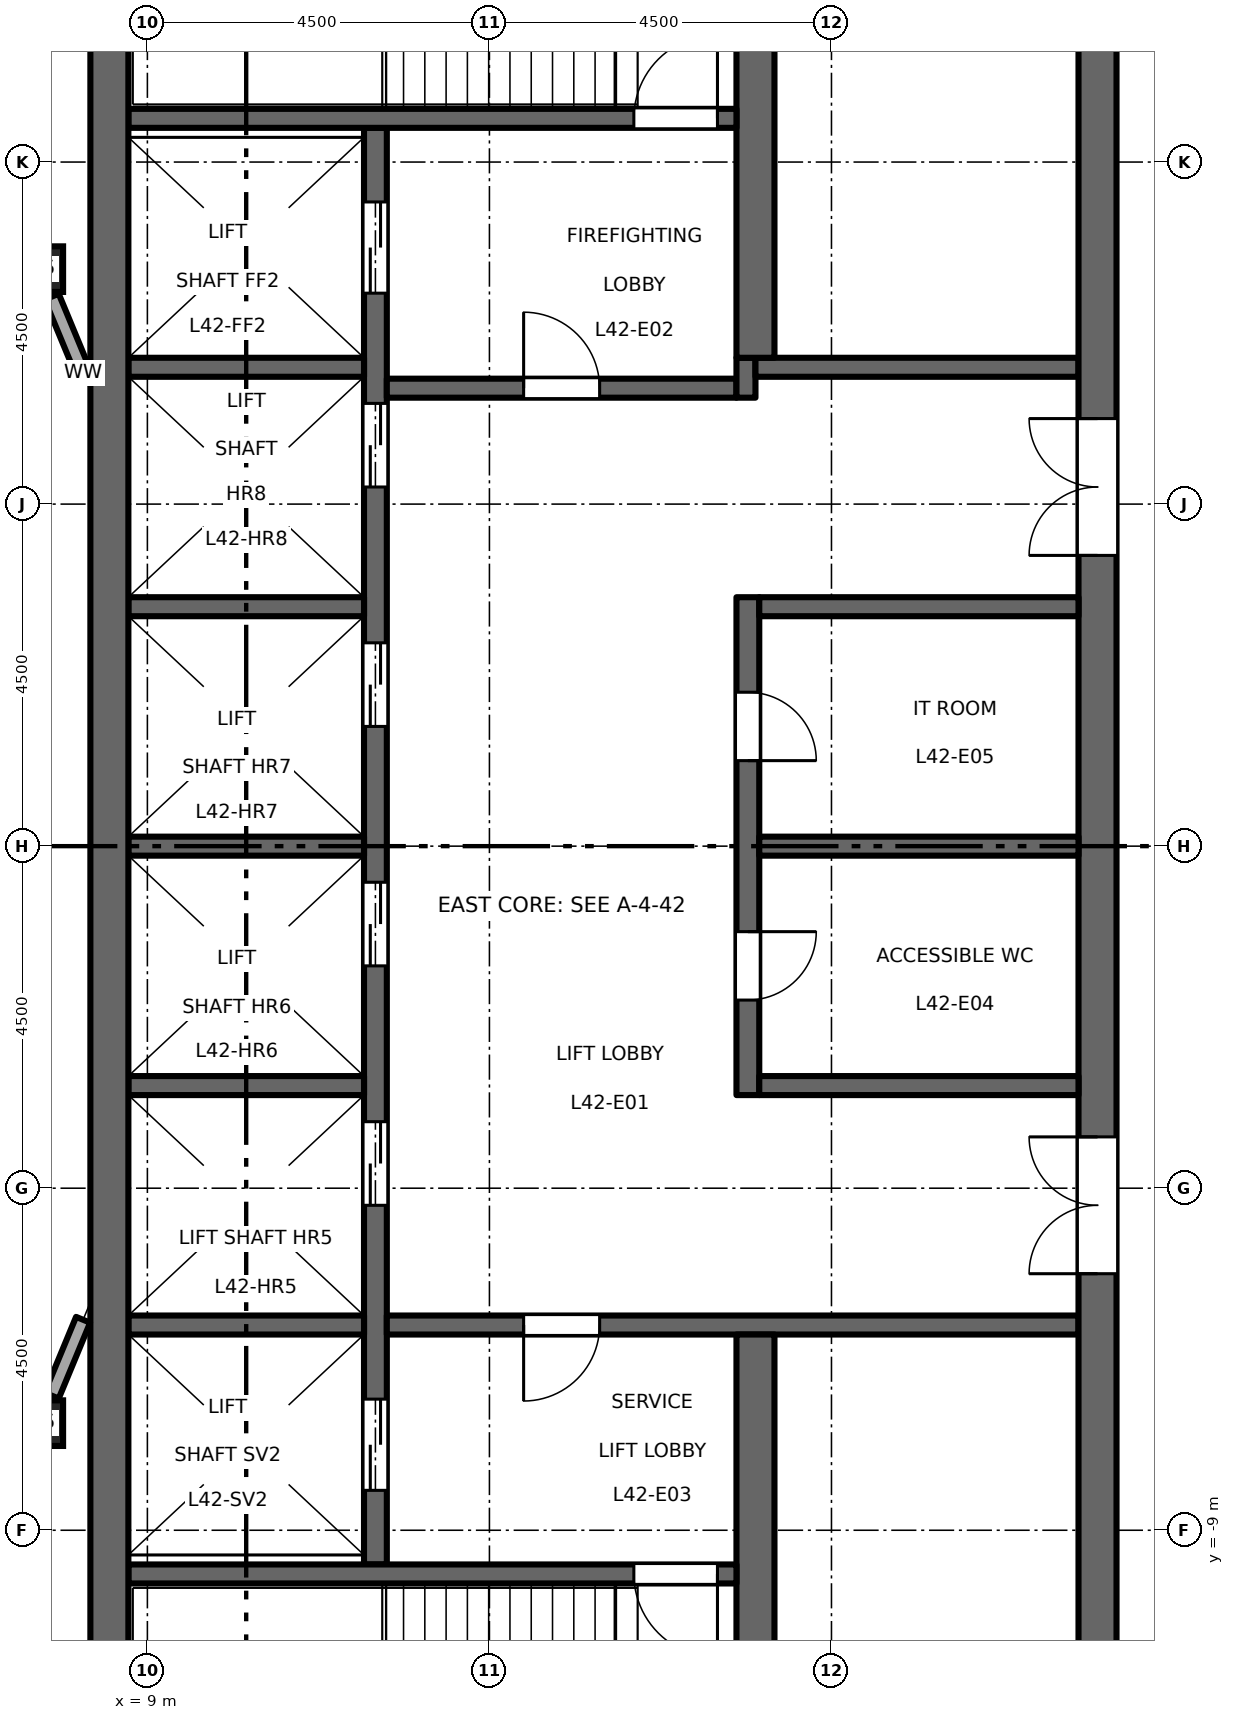
"""IFC4 building model, lengths in metres.
Left out: names, types, materials, properties, quantities, classifications, styles, units other than length and angle.
Written with IfcOpenShell. Run it as: python <this file> out.ifc"""

import sys

from ifc_helpers import new_model, si_unit, direction, frame, frame_2d, origin, origin_2d, place, context, subcontext, project, spatial, rectangle, hollow_rectangle, extrude, element, fill, save


model = new_model("IFC4")
c1 = context("Model", 3, precision=1e-05, world=origin(), true_north=direction((0.0, 1.0)))
c2 = subcontext(c1, "Body", "Model", "MODEL_VIEW")
j1 = project(units=[si_unit("LENGTHUNIT", "METRE"), si_unit("PLANEANGLEUNIT", "RADIAN")], contexts=[c1])
p1 = place(None, origin())
s1 = spatial("IfcSite", under=j1, at=p1, CompositionType="ELEMENT")
p2 = place(p1, origin())
s2 = spatial("IfcBuilding", under=s1, at=p2, CompositionType="ELEMENT")
p3 = place(p2, frame((0.0, 0.0, 197.2)))
s3 = spatial("IfcBuildingStorey", under=s2, at=p3, CompositionType="ELEMENT", Elevation=197.2)
for number, where, z_axis, x_axis in (
    (1, (7.591, -7.591, 0.0), (0.0, 0.0, 1.0), (1.0, 0.0, 0.0)),
    (2, (7.591, 7.591, 0.0), (0.0, 0.0, 1.0), (1.0, 0.0, 0.0)),
):
    element("IfcColumn", number, at=place(p3, frame(where, z_axis=z_axis, x_axis=x_axis)), inside=s3, PredefinedType="COLUMN", context=c2, shape_type="SweptSolid", body=[
        extrude(hollow_rectangle(XDim=0.6, YDim=0.6, WallThickness=0.032, at=origin_2d()), origin(), (0.0, 0.0, 1.0), 4.5),
    ])
p4 = place(p3, frame((12.0, -9.45, 0.0), z_axis=(0.0, 0.0, 1.0), x_axis=(0.0, 1.0, 0.0)))
e3 = element("IfcWall", 3, at=p4, inside=s3, PredefinedType="SHEAR", context=c2, shape_type="SweptSolid", body=[
    extrude(rectangle(XDim=18.9, YDim=0.3, at=frame_2d((9.45, 0.0))), origin(), (0.0, 0.0, 1.0), 4.35),
])
p5 = place(p4, frame((4.725, 0.0, 0.0)))
e4 = element("IfcOpeningElement", 4, at=p5, cuts=e3, PredefinedType="OPENING", context=c2, shape_type="SweptSolid", body=[
    extrude(rectangle(XDim=1.1, YDim=2.1, at=frame_2d((0.55, 1.05))), frame((0.0, 0.16, 0.0), z_axis=(0.0, -1.0, 0.0), x_axis=(1.0, 0.0, 0.0)), (0.0, 0.0, 1.0), 0.32),
])
p6 = place(p4, frame((7.875, 0.0, 0.0)))
e5 = element("IfcOpeningElement", 5, at=p6, cuts=e3, PredefinedType="OPENING", context=c2, shape_type="SweptSolid", body=[
    extrude(rectangle(XDim=1.1, YDim=2.1, at=frame_2d((0.55, 1.05))), frame((0.0, 0.16, 0.0), z_axis=(0.0, -1.0, 0.0), x_axis=(1.0, 0.0, 0.0)), (0.0, 0.0, 1.0), 0.32),
])
p7 = place(p4, frame((11.025, 0.0, 0.0)))
e6 = element("IfcOpeningElement", 6, at=p7, cuts=e3, PredefinedType="OPENING", context=c2, shape_type="SweptSolid", body=[
    extrude(rectangle(XDim=1.1, YDim=2.1, at=frame_2d((0.55, 1.05))), frame((0.0, 0.16, 0.0), z_axis=(0.0, -1.0, 0.0), x_axis=(1.0, 0.0, 0.0)), (0.0, 0.0, 1.0), 0.32),
])
p8 = place(p4, frame((14.175, 0.0, 0.0)))
e7 = element("IfcOpeningElement", 7, at=p8, cuts=e3, PredefinedType="OPENING", context=c2, shape_type="SweptSolid", body=[
    extrude(rectangle(XDim=1.1, YDim=2.1, at=frame_2d((0.55, 1.05))), frame((0.0, 0.16, 0.0), z_axis=(0.0, -1.0, 0.0), x_axis=(1.0, 0.0, 0.0)), (0.0, 0.0, 1.0), 0.32),
])
p9 = place(p4, frame((16.725, 0.0, 0.0)))
e8 = element("IfcOpeningElement", 8, at=p9, cuts=e3, PredefinedType="OPENING", context=c2, shape_type="SweptSolid", body=[
    extrude(rectangle(XDim=1.2, YDim=2.1, at=frame_2d((0.6, 1.05))), frame((0.0, 0.16, 0.0), z_axis=(0.0, -1.0, 0.0), x_axis=(1.0, 0.0, 0.0)), (0.0, 0.0, 1.0), 0.32),
])
p10 = place(p4, frame((0.975, 0.0, 0.0)))
e9 = element("IfcOpeningElement", 9, at=p10, cuts=e3, PredefinedType="OPENING", context=c2, shape_type="SweptSolid", body=[
    extrude(rectangle(XDim=1.2, YDim=2.1, at=frame_2d((0.6, 1.05))), frame((0.0, 0.16, 0.0), z_axis=(0.0, -1.0, 0.0), x_axis=(1.0, 0.0, 0.0)), (0.0, 0.0, 1.0), 0.32),
])
p11 = place(p3, frame((12.15, 6.025, 0.0), z_axis=(0.0, 0.0, 1.0), x_axis=(1.0, 0.0, 0.0)))
e10 = element("IfcWall", 10, at=p11, inside=s3, PredefinedType="SHEAR", context=c2, shape_type="SweptSolid", body=[
    extrude(rectangle(XDim=4.6, YDim=0.25, at=frame_2d((2.3, 0.0))), origin(), (0.0, 0.0, 1.0), 4.35),
])
p12 = place(p11, frame((1.8, 0.0, 0.0)))
e11 = element("IfcOpeningElement", 11, at=p12, cuts=e10, PredefinedType="OPENING", context=c2, shape_type="SweptSolid", body=[
    extrude(rectangle(XDim=1.0, YDim=2.1, at=frame_2d((0.5, 1.05))), frame((0.0, 0.135, 0.0), z_axis=(0.0, -1.0, 0.0), x_axis=(1.0, 0.0, 0.0)), (0.0, 0.0, 1.0), 0.27),
])
p13 = place(p3, frame((16.875, 5.9, 0.0), z_axis=(0.0, 0.0, 1.0), x_axis=(0.0, 1.0, 0.0)))
e12 = element("IfcWall", 12, at=p13, inside=s3, PredefinedType="SHEAR", context=c2, shape_type="SweptSolid", body=[
    extrude(rectangle(XDim=0.525, YDim=0.25, at=frame_2d((0.263, 0.0))), origin(), (0.0, 0.0, 1.0), 4.35),
])
p14 = place(p3, frame((17.0, 6.3, 0.0), z_axis=(0.0, 0.0, 1.0), x_axis=(1.0, 0.0, 0.0)))
e13 = element("IfcWall", 13, at=p14, inside=s3, PredefinedType="SHEAR", context=c2, shape_type="SweptSolid", body=[
    extrude(rectangle(XDim=4.25, YDim=0.25, at=frame_2d((2.125, 0.0))), origin(), (0.0, 0.0, 1.0), 4.35),
])
p15 = place(p3, frame((12.15, -6.3, 0.0), z_axis=(0.0, 0.0, 1.0), x_axis=(1.0, 0.0, 0.0)))
e14 = element("IfcWall", 14, at=p15, inside=s3, PredefinedType="SHEAR", context=c2, shape_type="SweptSolid", body=[
    extrude(rectangle(XDim=9.1, YDim=0.25, at=frame_2d((4.55, 0.0))), origin(), (0.0, 0.0, 1.0), 4.35),
])
p16 = place(p15, frame((1.8, 0.0, 0.0)))
e15 = element("IfcOpeningElement", 15, at=p16, cuts=e14, PredefinedType="OPENING", context=c2, shape_type="SweptSolid", body=[
    extrude(rectangle(XDim=1.0, YDim=2.1, at=frame_2d((0.5, 1.05))), frame((0.0, 0.135, 0.0), z_axis=(0.0, -1.0, 0.0), x_axis=(1.0, 0.0, 0.0)), (0.0, 0.0, 1.0), 0.27),
])
p17 = place(p3, frame((21.5, -13.0, 0.0), z_axis=(0.0, 0.0, 1.0), x_axis=(0.0, 1.0, 0.0)))
e16 = element("IfcWall", 16, at=p17, inside=s3, PredefinedType="SHEAR", context=c2, shape_type="SweptSolid", body=[
    extrude(rectangle(XDim=26.0, YDim=0.5, at=frame_2d((13.0, 0.0))), origin(), (0.0, 0.0, 1.0), 4.35),
])
p18 = place(p17, frame((16.825, 0.0, 0.0)))
e17 = element("IfcOpeningElement", 17, at=p18, cuts=e16, PredefinedType="OPENING", context=c2, shape_type="SweptSolid", body=[
    extrude(rectangle(XDim=1.8, YDim=2.1, at=frame_2d((0.9, 1.05))), frame((0.0, 0.26, 0.0), z_axis=(0.0, -1.0, 0.0), x_axis=(1.0, 0.0, 0.0)), (0.0, 0.0, 1.0), 0.52),
])
p19 = place(p17, frame((7.375, 0.0, 0.0)))
e18 = element("IfcOpeningElement", 18, at=p19, cuts=e16, PredefinedType="OPENING", context=c2, shape_type="SweptSolid", body=[
    extrude(rectangle(XDim=1.8, YDim=2.1, at=frame_2d((0.9, 1.05))), frame((0.0, 0.26, 0.0), z_axis=(0.0, -1.0, 0.0), x_axis=(1.0, 0.0, 0.0)), (0.0, 0.0, 1.0), 0.52),
])
p20 = place(p3, frame((16.9, -3.275, 0.0), z_axis=(0.0, 0.0, 1.0), x_axis=(0.0, 1.0, 0.0)))
e19 = element("IfcWall", 19, at=p20, inside=s3, PredefinedType="SHEAR", context=c2, shape_type="SweptSolid", body=[
    extrude(rectangle(XDim=6.55, YDim=0.3, at=frame_2d((3.275, 0.0))), origin(), (0.0, 0.0, 1.0), 4.35),
])
p21 = place(p20, frame((1.25, 0.0, 0.0)))
e20 = element("IfcOpeningElement", 20, at=p21, cuts=e19, PredefinedType="OPENING", context=c2, shape_type="SweptSolid", body=[
    extrude(rectangle(XDim=0.9, YDim=2.1, at=frame_2d((0.45, 1.05))), frame((0.0, 0.16, 0.0), z_axis=(0.0, -1.0, 0.0), x_axis=(1.0, 0.0, 0.0)), (0.0, 0.0, 1.0), 0.32),
])
p22 = place(p20, frame((4.4, 0.0, 0.0)))
e21 = element("IfcOpeningElement", 21, at=p22, cuts=e19, PredefinedType="OPENING", context=c2, shape_type="SweptSolid", body=[
    extrude(rectangle(XDim=0.9, YDim=2.1, at=frame_2d((0.45, 1.05))), frame((0.0, 0.16, 0.0), z_axis=(0.0, -1.0, 0.0), x_axis=(1.0, 0.0, 0.0)), (0.0, 0.0, 1.0), 0.32),
])
for number, where, z_axis, x_axis in (
    (22, (17.05, 0.0, 0.0), (0.0, 0.0, 1.0), (1.0, 0.0, 0.0)),
    (23, (17.05, 3.15, 0.0), (0.0, 0.0, 1.0), (1.0, 0.0, 0.0)),
    (24, (17.05, -3.15, 0.0), (0.0, 0.0, 1.0), (1.0, 0.0, 0.0)),
):
    element("IfcWall", number, at=place(p3, frame(where, z_axis=z_axis, x_axis=x_axis)), inside=s3, PredefinedType="SHEAR", context=c2, shape_type="SweptSolid", body=[
        extrude(rectangle(XDim=4.2, YDim=0.25, at=frame_2d((2.1, 0.0))), origin(), (0.0, 0.0, 1.0), 4.35),
    ])
for number, where, z_axis, x_axis in (
    (25, (17.0, 6.425, 0.0), (0.0, 0.0, 1.0), (0.0, 1.0, 0.0)),
    (26, (17.0, -13.0, 0.0), (0.0, 0.0, 1.0), (0.0, 1.0, 0.0)),
):
    element("IfcWall", number, at=place(p3, frame(where, z_axis=z_axis, x_axis=x_axis)), inside=s3, PredefinedType="SHEAR", context=c2, shape_type="SweptSolid", body=[
        extrude(rectangle(XDim=6.575, YDim=0.5, at=frame_2d((3.288, 0.0))), origin(), (0.0, 0.0, 1.0), 4.35),
    ])
for number, where, z_axis, x_axis in (
    (27, (8.75, 0.0, 0.0), (0.0, 0.0, 1.0), (1.0, 0.0, 0.0)),
    (28, (8.75, 3.15, 0.0), (0.0, 0.0, 1.0), (1.0, 0.0, 0.0)),
    (29, (8.75, 6.3, 0.0), (0.0, 0.0, 1.0), (1.0, 0.0, 0.0)),
    (30, (8.75, -3.15, 0.0), (0.0, 0.0, 1.0), (1.0, 0.0, 0.0)),
    (31, (8.75, -6.3, 0.0), (0.0, 0.0, 1.0), (1.0, 0.0, 0.0)),
):
    element("IfcWall", number, at=place(p3, frame(where, z_axis=z_axis, x_axis=x_axis)), inside=s3, PredefinedType="SHEAR", context=c2, shape_type="SweptSolid", body=[
        extrude(rectangle(XDim=3.1, YDim=0.25, at=frame_2d((1.55, 0.0))), origin(), (0.0, 0.0, 1.0), 4.35),
    ])
p23 = place(p3, frame((8.75, 9.575, 0.0), z_axis=(0.0, 0.0, 1.0), x_axis=(1.0, 0.0, 0.0)))
e32 = element("IfcWall", 32, at=p23, inside=s3, PredefinedType="SHEAR", context=c2, shape_type="SweptSolid", body=[
    extrude(rectangle(XDim=8.0, YDim=0.25, at=frame_2d((4.0, 0.0))), origin(), (0.0, 0.0, 1.0), 4.35),
])
p24 = place(p23, frame((6.65, 0.0, 0.0)))
e33 = element("IfcOpeningElement", 33, at=p24, cuts=e32, PredefinedType="OPENING", context=c2, shape_type="SweptSolid", body=[
    extrude(rectangle(XDim=1.1, YDim=2.1, at=frame_2d((0.55, 1.05))), frame((0.0, 0.135, 0.0), z_axis=(0.0, -1.0, 0.0), x_axis=(1.0, 0.0, 0.0)), (0.0, 0.0, 1.0), 0.27),
])
p25 = place(p3, frame((8.75, -9.575, 0.0), z_axis=(0.0, 0.0, 1.0), x_axis=(1.0, 0.0, 0.0)))
e34 = element("IfcWall", 34, at=p25, inside=s3, PredefinedType="SHEAR", context=c2, shape_type="SweptSolid", body=[
    extrude(rectangle(XDim=8.0, YDim=0.25, at=frame_2d((4.0, 0.0))), origin(), (0.0, 0.0, 1.0), 4.35),
])
p26 = place(p25, frame((6.65, 0.0, 0.0)))
e35 = element("IfcOpeningElement", 35, at=p26, cuts=e34, PredefinedType="OPENING", context=c2, shape_type="SweptSolid", body=[
    extrude(rectangle(XDim=1.1, YDim=2.1, at=frame_2d((0.55, 1.05))), frame((0.0, 0.135, 0.0), z_axis=(0.0, -1.0, 0.0), x_axis=(1.0, 0.0, 0.0)), (0.0, 0.0, 1.0), 0.27),
])
p27 = place(p3, frame((8.5, -13.0, 0.0), z_axis=(0.0, 0.0, 1.0), x_axis=(0.0, 1.0, 0.0)))
e36 = element("IfcWall", 36, at=p27, inside=s3, PredefinedType="SHEAR", context=c2, shape_type="SweptSolid", body=[
    extrude(rectangle(XDim=26.0, YDim=0.5, at=frame_2d((13.0, 0.0))), origin(), (0.0, 0.0, 1.0), 4.35),
])
for number, where, z_axis, x_axis in (
    (37, (7.741, -7.229, 0.0), (0.0, 0.0, 1.0), (0.383, 0.924, 0.0)),
    (38, (8.154, 6.231, 0.0), (0.0, 0.0, 1.0), (-0.383, 0.924, 0.0)),
):
    element("IfcWall", number, at=place(p3, frame(where, z_axis=z_axis, x_axis=x_axis)), inside=s3, PredefinedType="STANDARD", context=c2, shape_type="SweptSolid", body=[
        extrude(rectangle(XDim=1.08, YDim=0.2, at=frame_2d((0.54, 0.0))), origin(), (0.0, 0.0, 1.0), 3.918),
    ])
p28 = place(p12, origin())
e39 = element("IfcDoor", 39, at=p28, inside=s3, OperationType="SINGLE_SWING_RIGHT", PredefinedType="DOOR", context=c2, shape_type="SweptSolid", body=[
    extrude(rectangle(XDim=1.0, YDim=2.1, at=frame_2d((0.5, 1.05))), frame((0.0, 0.025, 0.0), z_axis=(0.0, -1.0, 0.0), x_axis=(1.0, 0.0, 0.0)), (0.0, 0.0, 1.0), 0.05),
])
fill(e11, e39)
p29 = place(p16, origin())
e40 = element("IfcDoor", 40, at=p29, inside=s3, OperationType="SINGLE_SWING_LEFT", PredefinedType="DOOR", context=c2, shape_type="SweptSolid", body=[
    extrude(rectangle(XDim=1.0, YDim=2.1, at=frame_2d((0.5, 1.05))), frame((0.0, 0.025, 0.0), z_axis=(0.0, -1.0, 0.0), x_axis=(1.0, 0.0, 0.0)), (0.0, 0.0, 1.0), 0.05),
])
fill(e15, e40)
p30 = place(p24, origin())
e41 = element("IfcDoor", 41, at=p30, inside=s3, OperationType="SINGLE_SWING_LEFT", PredefinedType="DOOR", context=c2, shape_type="SweptSolid", body=[
    extrude(rectangle(XDim=1.1, YDim=2.1, at=frame_2d((0.55, 1.05))), frame((0.0, 0.025, 0.0), z_axis=(0.0, -1.0, 0.0), x_axis=(1.0, 0.0, 0.0)), (0.0, 0.0, 1.0), 0.05),
])
fill(e33, e41)
p31 = place(p26, origin())
e42 = element("IfcDoor", 42, at=p31, inside=s3, OperationType="SINGLE_SWING_RIGHT", PredefinedType="DOOR", context=c2, shape_type="SweptSolid", body=[
    extrude(rectangle(XDim=1.1, YDim=2.1, at=frame_2d((0.55, 1.05))), frame((0.0, 0.025, 0.0), z_axis=(0.0, -1.0, 0.0), x_axis=(1.0, 0.0, 0.0)), (0.0, 0.0, 1.0), 0.05),
])
fill(e35, e42)
p32 = place(p18, origin())
e43 = element("IfcDoor", 43, at=p32, inside=s3, OperationType="DOUBLE_DOOR_DOUBLE_SWING", PredefinedType="DOOR", context=c2, shape_type="SweptSolid", body=[
    extrude(rectangle(XDim=1.8, YDim=2.1, at=frame_2d((0.9, 1.05))), frame((0.0, 0.025, 0.0), z_axis=(0.0, -1.0, 0.0), x_axis=(1.0, 0.0, 0.0)), (0.0, 0.0, 1.0), 0.05),
])
fill(e17, e43)
p33 = place(p19, origin())
e44 = element("IfcDoor", 44, at=p33, inside=s3, OperationType="DOUBLE_DOOR_DOUBLE_SWING", PredefinedType="DOOR", context=c2, shape_type="SweptSolid", body=[
    extrude(rectangle(XDim=1.8, YDim=2.1, at=frame_2d((0.9, 1.05))), frame((0.0, 0.025, 0.0), z_axis=(0.0, -1.0, 0.0), x_axis=(1.0, 0.0, 0.0)), (0.0, 0.0, 1.0), 0.05),
])
fill(e18, e44)
p34 = place(p5, origin())
e45 = element("IfcDoor", 45, at=p34, inside=s3, OperationType="DOUBLE_DOOR_SLIDING", PredefinedType="DOOR", context=c2, shape_type="SweptSolid", body=[
    extrude(rectangle(XDim=1.1, YDim=2.1, at=frame_2d((0.55, 1.05))), frame((0.0, 0.025, 0.0), z_axis=(0.0, -1.0, 0.0), x_axis=(1.0, 0.0, 0.0)), (0.0, 0.0, 1.0), 0.05),
])
fill(e4, e45)
p35 = place(p6, origin())
e46 = element("IfcDoor", 46, at=p35, inside=s3, OperationType="DOUBLE_DOOR_SLIDING", PredefinedType="DOOR", context=c2, shape_type="SweptSolid", body=[
    extrude(rectangle(XDim=1.1, YDim=2.1, at=frame_2d((0.55, 1.05))), frame((0.0, 0.025, 0.0), z_axis=(0.0, -1.0, 0.0), x_axis=(1.0, 0.0, 0.0)), (0.0, 0.0, 1.0), 0.05),
])
fill(e5, e46)
p36 = place(p7, origin())
e47 = element("IfcDoor", 47, at=p36, inside=s3, OperationType="DOUBLE_DOOR_SLIDING", PredefinedType="DOOR", context=c2, shape_type="SweptSolid", body=[
    extrude(rectangle(XDim=1.1, YDim=2.1, at=frame_2d((0.55, 1.05))), frame((0.0, 0.025, 0.0), z_axis=(0.0, -1.0, 0.0), x_axis=(1.0, 0.0, 0.0)), (0.0, 0.0, 1.0), 0.05),
])
fill(e6, e47)
p37 = place(p8, origin())
e48 = element("IfcDoor", 48, at=p37, inside=s3, OperationType="DOUBLE_DOOR_SLIDING", PredefinedType="DOOR", context=c2, shape_type="SweptSolid", body=[
    extrude(rectangle(XDim=1.1, YDim=2.1, at=frame_2d((0.55, 1.05))), frame((0.0, 0.025, 0.0), z_axis=(0.0, -1.0, 0.0), x_axis=(1.0, 0.0, 0.0)), (0.0, 0.0, 1.0), 0.05),
])
fill(e7, e48)
p38 = place(p9, origin())
e49 = element("IfcDoor", 49, at=p38, inside=s3, OperationType="DOUBLE_DOOR_SLIDING", PredefinedType="DOOR", context=c2, shape_type="SweptSolid", body=[
    extrude(rectangle(XDim=1.2, YDim=2.1, at=frame_2d((0.6, 1.05))), frame((0.0, 0.025, 0.0), z_axis=(0.0, -1.0, 0.0), x_axis=(1.0, 0.0, 0.0)), (0.0, 0.0, 1.0), 0.05),
])
fill(e8, e49)
p39 = place(p10, origin())
e50 = element("IfcDoor", 50, at=p39, inside=s3, OperationType="DOUBLE_DOOR_SLIDING", PredefinedType="DOOR", context=c2, shape_type="SweptSolid", body=[
    extrude(rectangle(XDim=1.2, YDim=2.1, at=frame_2d((0.6, 1.05))), frame((0.0, 0.025, 0.0), z_axis=(0.0, -1.0, 0.0), x_axis=(1.0, 0.0, 0.0)), (0.0, 0.0, 1.0), 0.05),
])
fill(e9, e50)
p40 = place(p21, origin())
e51 = element("IfcDoor", 51, at=p40, inside=s3, OperationType="SINGLE_SWING_RIGHT", PredefinedType="DOOR", context=c2, shape_type="SweptSolid", body=[
    extrude(rectangle(XDim=0.9, YDim=2.1, at=frame_2d((0.45, 1.05))), frame((0.0, 0.025, 0.0), z_axis=(0.0, -1.0, 0.0), x_axis=(1.0, 0.0, 0.0)), (0.0, 0.0, 1.0), 0.05),
])
fill(e20, e51)
p41 = place(p22, origin())
e52 = element("IfcDoor", 52, at=p41, inside=s3, OperationType="SINGLE_SWING_LEFT", PredefinedType="DOOR", context=c2, shape_type="SweptSolid", body=[
    extrude(rectangle(XDim=0.9, YDim=2.1, at=frame_2d((0.45, 1.05))), frame((0.0, 0.025, 0.0), z_axis=(0.0, -1.0, 0.0), x_axis=(1.0, 0.0, 0.0)), (0.0, 0.0, 1.0), 0.05),
])
fill(e21, e52)
save(model, sys.argv[1])
